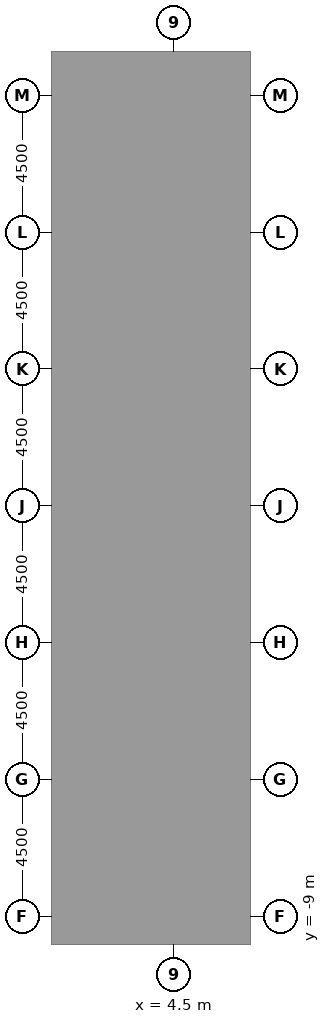
"""IFC4 building model, lengths in metres.
Left out: names, types, materials, properties, quantities, classifications, styles, units other than length and angle.
Written with IfcOpenShell. Run it as: python <this file> out.ifc"""

import sys

from ifc_helpers import new_model, si_unit, direction, frame, frame_2d, origin, place, context, subcontext, project, spatial, rectangle, extrude, element, fill, save


model = new_model("IFC4")
c1 = context("Model", 3, precision=1e-05, world=origin(), true_north=direction((0.0, 1.0)))
c2 = subcontext(c1, "Body", "Model", "MODEL_VIEW")
j1 = project(units=[si_unit("LENGTHUNIT", "METRE"), si_unit("PLANEANGLEUNIT", "RADIAN")], contexts=[c1])
p1 = place(None, origin())
s1 = spatial("IfcSite", under=j1, at=p1, CompositionType="ELEMENT")
p2 = place(p1, origin())
s2 = spatial("IfcBuilding", under=s1, at=p2, CompositionType="ELEMENT")
p3 = place(p2, origin())
s3 = spatial("IfcBuildingStorey", under=s2, at=p3, CompositionType="ELEMENT", Elevation=0.0)
p4 = place(p3, frame((1.0, -9.0, 0.0), z_axis=(0.0, 0.0, 1.0), x_axis=(0.0, 1.0, 0.0)))
e1 = element("IfcWall", 1, at=p4, inside=s3, PredefinedType="SHEAR", context=c2, shape_type="SweptSolid", body=[
    extrude(rectangle(XDim=27.5, YDim=1.0, at=frame_2d((13.75, 0.0))), origin(), (0.0, 0.0, 1.0), 7.2),
])
p5 = place(p4, frame((12.55, 0.0, 0.0)))
e2 = element("IfcOpeningElement", 2, at=p5, cuts=e1, PredefinedType="OPENING", context=c2, shape_type="SweptSolid", body=[
    extrude(rectangle(XDim=2.4, YDim=2.4, at=frame_2d((1.2, 1.2))), frame((0.0, 0.51, 0.0), z_axis=(0.0, -1.0, 0.0), x_axis=(1.0, 0.0, 0.0)), (0.0, 0.0, 1.0), 1.02),
])
p6 = place(p4, frame((3.955, 0.0, 0.0)))
e3 = element("IfcOpeningElement", 3, at=p6, cuts=e1, PredefinedType="OPENING", context=c2, shape_type="SweptSolid", body=[
    extrude(rectangle(XDim=0.905, YDim=2.1, at=frame_2d((0.453, 1.05))), frame((0.0, 0.51, 0.0), z_axis=(0.0, -1.0, 0.0), x_axis=(1.0, 0.0, 0.0)), (0.0, 0.0, 1.0), 1.02),
])
p7 = place(p4, frame((23.363, 0.0, 0.0)))
e4 = element("IfcOpeningElement", 4, at=p7, cuts=e1, PredefinedType="OPENING", context=c2, shape_type="SweptSolid", body=[
    extrude(rectangle(XDim=1.2, YDim=2.1, at=frame_2d((0.6, 1.05))), frame((0.0, 0.51, 0.0), z_axis=(0.0, -1.0, 0.0), x_axis=(1.0, 0.0, 0.0)), (0.0, 0.0, 1.0), 1.02),
])
p8 = place(p3, frame((6.5, -9.0, 0.0), z_axis=(0.0, 0.0, 1.0), x_axis=(0.0, 1.0, 0.0)))
e5 = element("IfcWall", 5, at=p8, inside=s3, PredefinedType="SHEAR", context=c2, shape_type="SweptSolid", body=[
    extrude(rectangle(XDim=27.5, YDim=1.0, at=frame_2d((13.75, 0.0))), origin(), (0.0, 0.0, 1.0), 7.2),
])
p9 = place(p8, frame((12.55, 0.0, 0.0)))
e6 = element("IfcOpeningElement", 6, at=p9, cuts=e5, PredefinedType="OPENING", context=c2, shape_type="SweptSolid", body=[
    extrude(rectangle(XDim=2.4, YDim=2.4, at=frame_2d((1.2, 1.2))), frame((0.0, 0.51, 0.0), z_axis=(0.0, -1.0, 0.0), x_axis=(1.0, 0.0, 0.0)), (0.0, 0.0, 1.0), 1.02),
])
p10 = place(p8, frame((3.955, 0.0, 0.0)))
e7 = element("IfcOpeningElement", 7, at=p10, cuts=e5, PredefinedType="OPENING", context=c2, shape_type="SweptSolid", body=[
    extrude(rectangle(XDim=0.905, YDim=2.1, at=frame_2d((0.453, 1.05))), frame((0.0, 0.51, 0.0), z_axis=(0.0, -1.0, 0.0), x_axis=(1.0, 0.0, 0.0)), (0.0, 0.0, 1.0), 1.02),
])
p11 = place(p8, frame((23.363, 0.0, 0.0)))
e8 = element("IfcOpeningElement", 8, at=p11, cuts=e5, PredefinedType="OPENING", context=c2, shape_type="SweptSolid", body=[
    extrude(rectangle(XDim=1.2, YDim=2.1, at=frame_2d((0.6, 1.05))), frame((0.0, 0.51, 0.0), z_axis=(0.0, -1.0, 0.0), x_axis=(1.0, 0.0, 0.0)), (0.0, 0.0, 1.0), 1.02),
])
p12 = place(p3, frame((-2.445, -3.94, 0.0), z_axis=(0.0, 0.0, 1.0), x_axis=(1.0, 0.0, 0.0)))
e9 = element("IfcWall", 9, at=p12, inside=s3, PredefinedType="PARTITIONING", context=c2, shape_type="SweptSolid", body=[
    extrude(rectangle(XDim=2.945, YDim=0.1, at=frame_2d((1.473, 0.0))), origin(), (0.0, 0.0, 1.0), 6.75),
])
p13 = place(p12, frame((0.972, 0.0, 0.0)))
e10 = element("IfcOpeningElement", 10, at=p13, cuts=e9, PredefinedType="OPENING", context=c2, shape_type="SweptSolid", body=[
    extrude(rectangle(XDim=1.0, YDim=2.1, at=frame_2d((0.5, 1.05))), frame((0.0, 0.06, 0.0), z_axis=(0.0, -1.0, 0.0), x_axis=(1.0, 0.0, 0.0)), (0.0, 0.0, 1.0), 0.12),
])
p14 = place(p3, frame((7.0, 12.425, 0.0), z_axis=(0.0, 0.0, 1.0), x_axis=(1.0, 0.0, 0.0)))
e11 = element("IfcWall", 11, at=p14, inside=s3, PredefinedType="PARTITIONING", context=c2, shape_type="SweptSolid", body=[
    extrude(rectangle(XDim=1.3, YDim=0.1, at=frame_2d((0.65, 0.0))), origin(), (0.0, 0.0, 1.0), 6.75),
])
p15 = place(p14, frame((0.2, 0.0, 0.0)))
e12 = element("IfcOpeningElement", 12, at=p15, cuts=e11, PredefinedType="OPENING", context=c2, shape_type="SweptSolid", body=[
    extrude(rectangle(XDim=0.9, YDim=2.1, at=frame_2d((0.45, 1.05))), frame((0.0, 0.06, 0.0), z_axis=(0.0, -1.0, 0.0), x_axis=(1.0, 0.0, 0.0)), (0.0, 0.0, 1.0), 0.12),
])
p16 = place(p3, frame((1.5, -9.0, 0.0), z_axis=(0.0, 0.0, 1.0), x_axis=(1.0, 0.0, 0.0)))
e13 = element("IfcWall", 13, at=p16, inside=s3, PredefinedType="PARTITIONING", context=c2, shape_type="SweptSolid", body=[
    extrude(rectangle(XDim=4.5, YDim=0.15, at=frame_2d((2.25, 0.0))), origin(), (0.0, 0.0, 1.0), 6.75),
])
p17 = place(p16, frame((1.05, 0.0, 0.0)))
e14 = element("IfcOpeningElement", 14, at=p17, cuts=e13, PredefinedType="OPENING", context=c2, shape_type="SweptSolid", body=[
    extrude(rectangle(XDim=2.4, YDim=2.4, at=frame_2d((1.2, 1.2))), frame((0.0, 0.085, 0.0), z_axis=(0.0, -1.0, 0.0), x_axis=(1.0, 0.0, 0.0)), (0.0, 0.0, 1.0), 0.17),
])
p18 = place(p3, frame((1.5, 18.5, 0.0), z_axis=(0.0, 0.0, 1.0), x_axis=(1.0, 0.0, 0.0)))
e15 = element("IfcWall", 15, at=p18, inside=s3, PredefinedType="PARTITIONING", context=c2, shape_type="SweptSolid", body=[
    extrude(rectangle(XDim=4.5, YDim=0.15, at=frame_2d((2.25, 0.0))), origin(), (0.0, 0.0, 1.0), 6.75),
])
p19 = place(p18, frame((1.05, 0.0, 0.0)))
e16 = element("IfcOpeningElement", 16, at=p19, cuts=e15, PredefinedType="OPENING", context=c2, shape_type="SweptSolid", body=[
    extrude(rectangle(XDim=2.4, YDim=2.4, at=frame_2d((1.2, 1.2))), frame((0.0, 0.085, 0.0), z_axis=(0.0, -1.0, 0.0), x_axis=(1.0, 0.0, 0.0)), (0.0, 0.0, 1.0), 0.17),
])
p20 = place(p5, origin())
e17 = element("IfcDoor", 17, at=p20, inside=s3, OperationType="DOUBLE_DOOR_DOUBLE_SWING", PredefinedType="DOOR", context=c2, shape_type="SweptSolid", body=[
    extrude(rectangle(XDim=2.4, YDim=2.4, at=frame_2d((1.2, 1.2))), frame((0.0, 0.025, 0.0), z_axis=(0.0, -1.0, 0.0), x_axis=(1.0, 0.0, 0.0)), (0.0, 0.0, 1.0), 0.05),
])
fill(e2, e17)
p21 = place(p9, origin())
e18 = element("IfcDoor", 18, at=p21, inside=s3, OperationType="DOUBLE_DOOR_DOUBLE_SWING", PredefinedType="DOOR", context=c2, shape_type="SweptSolid", body=[
    extrude(rectangle(XDim=2.4, YDim=2.4, at=frame_2d((1.2, 1.2))), frame((0.0, 0.025, 0.0), z_axis=(0.0, -1.0, 0.0), x_axis=(1.0, 0.0, 0.0)), (0.0, 0.0, 1.0), 0.05),
])
fill(e6, e18)
p22 = place(p6, origin())
e19 = element("IfcDoor", 19, at=p22, inside=s3, OperationType="SINGLE_SWING_LEFT", PredefinedType="DOOR", context=c2, shape_type="SweptSolid", body=[
    extrude(rectangle(XDim=0.905, YDim=2.1, at=frame_2d((0.453, 1.05))), frame((0.0, 0.475, 0.0), z_axis=(0.0, -1.0, 0.0), x_axis=(1.0, 0.0, 0.0)), (0.0, 0.0, 1.0), 0.05),
])
fill(e3, e19)
p23 = place(p7, origin())
e20 = element("IfcDoor", 20, at=p23, inside=s3, OperationType="SINGLE_SWING_RIGHT", PredefinedType="DOOR", context=c2, shape_type="SweptSolid", body=[
    extrude(rectangle(XDim=1.2, YDim=2.1, at=frame_2d((0.6, 1.05))), frame((0.0, 0.475, 0.0), z_axis=(0.0, -1.0, 0.0), x_axis=(1.0, 0.0, 0.0)), (0.0, 0.0, 1.0), 0.05),
])
fill(e4, e20)
p24 = place(p10, origin())
e21 = element("IfcDoor", 21, at=p24, inside=s3, OperationType="SINGLE_SWING_RIGHT", PredefinedType="DOOR", context=c2, shape_type="SweptSolid", body=[
    extrude(rectangle(XDim=0.905, YDim=2.1, at=frame_2d((0.453, 1.05))), frame((0.0, -0.425, 0.0), z_axis=(0.0, -1.0, 0.0), x_axis=(1.0, 0.0, 0.0)), (0.0, 0.0, 1.0), 0.05),
])
fill(e7, e21)
p25 = place(p11, origin())
e22 = element("IfcDoor", 22, at=p25, inside=s3, OperationType="SINGLE_SWING_LEFT", PredefinedType="DOOR", context=c2, shape_type="SweptSolid", body=[
    extrude(rectangle(XDim=1.2, YDim=2.1, at=frame_2d((0.6, 1.05))), frame((0.0, -0.425, 0.0), z_axis=(0.0, -1.0, 0.0), x_axis=(1.0, 0.0, 0.0)), (0.0, 0.0, 1.0), 0.05),
])
fill(e8, e22)
p26 = place(p17, origin())
e23 = element("IfcDoor", 23, at=p26, inside=s3, OperationType="DOUBLE_DOOR_DOUBLE_SWING", PredefinedType="DOOR", context=c2, shape_type="SweptSolid", body=[
    extrude(rectangle(XDim=2.4, YDim=2.4, at=frame_2d((1.2, 1.2))), frame((0.0, 0.025, 0.0), z_axis=(0.0, -1.0, 0.0), x_axis=(1.0, 0.0, 0.0)), (0.0, 0.0, 1.0), 0.05),
])
fill(e14, e23)
p27 = place(p19, origin())
e24 = element("IfcDoor", 24, at=p27, inside=s3, OperationType="DOUBLE_DOOR_DOUBLE_SWING", PredefinedType="DOOR", context=c2, shape_type="SweptSolid", body=[
    extrude(rectangle(XDim=2.4, YDim=2.4, at=frame_2d((1.2, 1.2))), frame((0.0, 0.025, 0.0), z_axis=(0.0, -1.0, 0.0), x_axis=(1.0, 0.0, 0.0)), (0.0, 0.0, 1.0), 0.05),
])
fill(e16, e24)
save(model, sys.argv[1])
